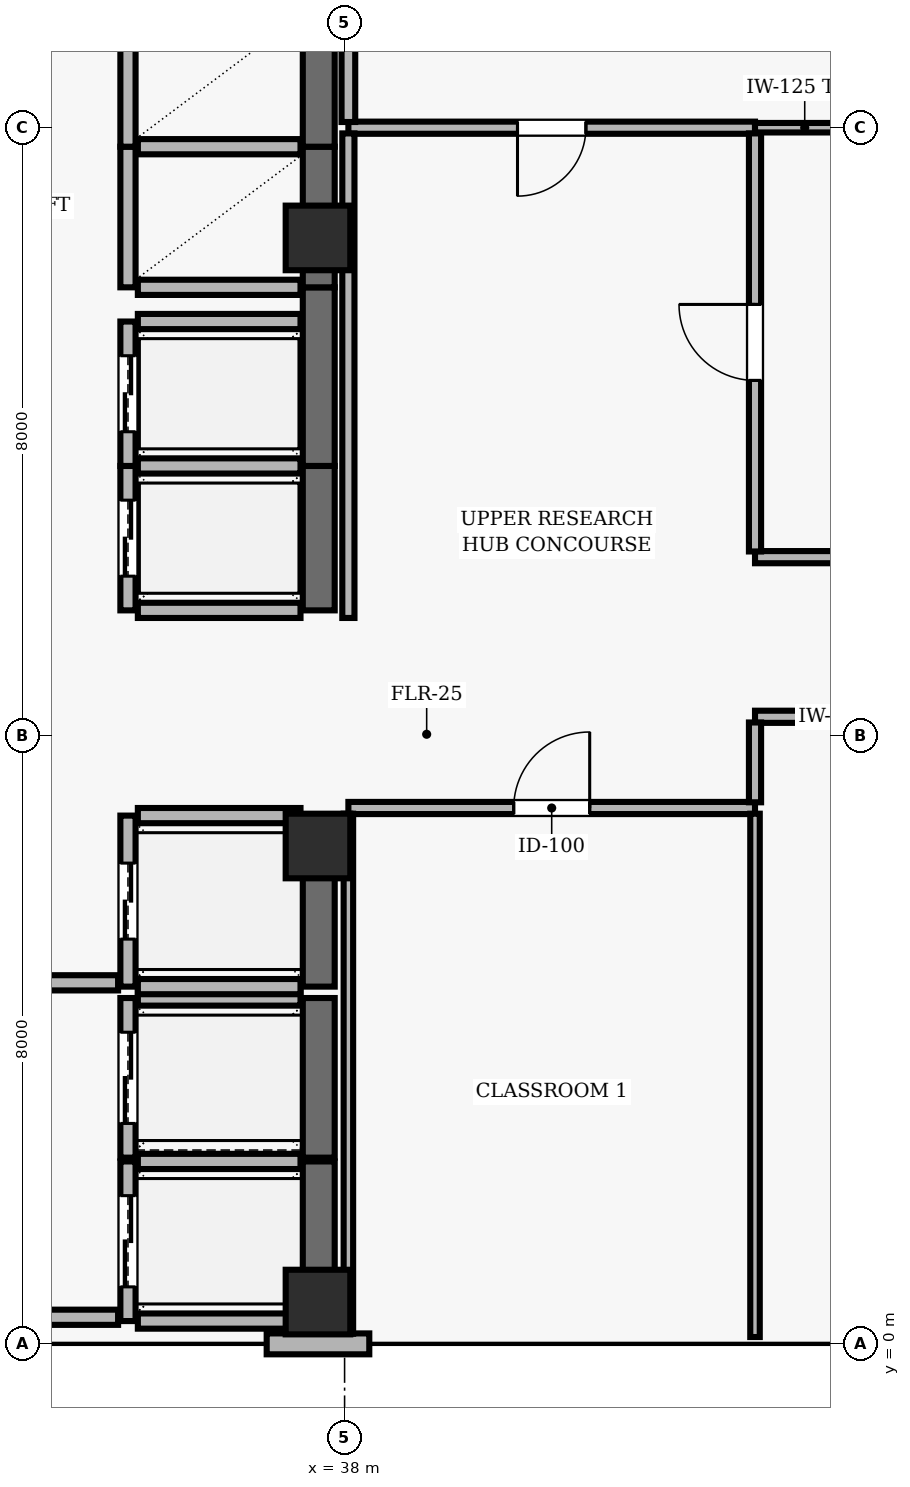
"""IFC4 building model, lengths in metres.
Left out: names, types, materials, properties, quantities, classifications, styles, units other than length and angle.
Written with IfcOpenShell. Run it as: python <this file> out.ifc"""

import sys

from ifc_helpers import new_model, si_unit, direction, frame, frame_2d, origin, origin_2d, place, context, subcontext, project, spatial, rectangle, extrude, element, fill, save


model = new_model("IFC4")
c1 = context("Model", 3, precision=1e-05, world=origin(), true_north=direction((0.0, 1.0)))
c2 = subcontext(c1, "Body", "Model", "MODEL_VIEW")
j1 = project(units=[si_unit("LENGTHUNIT", "METRE"), si_unit("PLANEANGLEUNIT", "RADIAN")], contexts=[c1])
p1 = place(None, origin())
s1 = spatial("IfcSite", under=j1, at=p1, CompositionType="ELEMENT")
p2 = place(p1, origin())
s2 = spatial("IfcBuilding", under=s1, at=p2, CompositionType="ELEMENT")
p3 = place(p2, frame((0.0, 0.0, 256.0)))
s3 = spatial("IfcBuildingStorey", under=s2, at=p3, CompositionType="ELEMENT", Elevation=256.0)
for number, where, z_axis, x_axis in (
    (1, (37.65, 0.55, 0.0), (0.0, 0.0, 1.0), (1.0, 0.0, 0.0)),
    (2, (37.65, 6.55, 0.0), (0.0, 0.0, 1.0), (1.0, 0.0, 0.0)),
    (3, (37.65, 14.55, 0.0), (0.0, 0.0, 1.0), (1.0, 0.0, 0.0)),
):
    element("IfcColumn", number, at=place(p3, frame(where, z_axis=z_axis, x_axis=x_axis)), inside=s3, PredefinedType="COLUMN", context=c2, shape_type="SweptSolid", body=[
        extrude(rectangle(XDim=0.85, YDim=0.85, at=origin_2d()), origin(), (0.0, 0.0, 1.0), 3.9),
    ])
p4 = place(p3, frame((36.975, 0.0, 0.0), z_axis=(0.0, 0.0, 1.0), x_axis=(1.0, 0.0, 0.0)))
e4 = element("IfcWall", 4, at=p4, inside=s3, PredefinedType="SOLIDWALL", context=c2, shape_type="SweptSolid", body=[
    extrude(rectangle(XDim=1.35, YDim=0.275, at=frame_2d((0.675, 0.0))), origin(), (0.0, 0.0, 1.0), 3.69),
])
p5 = place(p3, frame((35.15, 2.4, 0.0), z_axis=(0.0, 0.0, 1.0), x_axis=(0.0, -1.0, 0.0)))
e5 = element("IfcWall", 5, at=p5, inside=s3, PredefinedType="SOLIDWALL", context=c2, shape_type="SweptSolid", body=[
    extrude(rectangle(XDim=2.1, YDim=0.2, at=frame_2d((1.05, 0.0))), origin(), (0.0, 0.0, 1.0), 3.69),
])
p6 = place(p5, frame((0.45, 0.0, 0.0)))
e6 = element("IfcOpeningElement", 6, at=p6, cuts=e5, PredefinedType="OPENING", context=c2, shape_type="SweptSolid", body=[
    extrude(rectangle(XDim=1.2, YDim=2.15, at=frame_2d((0.6, 1.075))), frame((0.0, 0.11, 0.0), z_axis=(0.0, -1.0, 0.0), x_axis=(1.0, 0.0, 0.0)), (0.0, 0.0, 1.0), 0.22),
])
p7 = place(p3, frame((37.66, 0.3, 0.0), z_axis=(0.0, 0.0, 1.0), x_axis=(0.0, 1.0, 0.0)))
e7 = element("IfcWall", 7, at=p7, inside=s3, PredefinedType="SHEAR", context=c2, shape_type="SweptSolid", body=[
    extrude(rectangle(XDim=2.1, YDim=0.42, at=frame_2d((1.05, 0.0))), origin(), (0.0, 0.0, 1.0), 3.69),
])
for number, where, z_axis, x_axis in (
    (8, (35.28, 0.3, 0.0), (0.0, 0.0, 1.0), (1.0, 0.0, 0.0)),
    (9, (37.42, 2.4, 0.0), (0.0, 0.0, 1.0), (-1.0, 0.0, 0.0)),
):
    element("IfcWall", number, at=place(p3, frame(where, z_axis=z_axis, x_axis=x_axis)), inside=s3, PredefinedType="SOLIDWALL", context=c2, shape_type="SweptSolid", body=[
        extrude(rectangle(XDim=2.14, YDim=0.2, at=frame_2d((1.07, 0.0))), origin(), (0.0, 0.0, 1.0), 3.69),
    ])
p8 = place(p3, frame((35.15, 4.55, 0.0), z_axis=(0.0, 0.0, 1.0), x_axis=(0.0, -1.0, 0.0)))
e10 = element("IfcWall", 10, at=p8, inside=s3, PredefinedType="SOLIDWALL", context=c2, shape_type="SweptSolid", body=[
    extrude(rectangle(XDim=2.1, YDim=0.2, at=frame_2d((1.05, 0.0))), origin(), (0.0, 0.0, 1.0), 3.69),
])
p9 = place(p8, frame((0.45, 0.0, 0.0)))
e11 = element("IfcOpeningElement", 11, at=p9, cuts=e10, PredefinedType="OPENING", context=c2, shape_type="SweptSolid", body=[
    extrude(rectangle(XDim=1.2, YDim=2.15, at=frame_2d((0.6, 1.075))), frame((0.0, 0.11, 0.0), z_axis=(0.0, -1.0, 0.0), x_axis=(1.0, 0.0, 0.0)), (0.0, 0.0, 1.0), 0.22),
])
p10 = place(p3, frame((37.66, 2.45, 0.0), z_axis=(0.0, 0.0, 1.0), x_axis=(0.0, 1.0, 0.0)))
e12 = element("IfcWall", 12, at=p10, inside=s3, PredefinedType="SHEAR", context=c2, shape_type="SweptSolid", body=[
    extrude(rectangle(XDim=2.1, YDim=0.42, at=frame_2d((1.05, 0.0))), origin(), (0.0, 0.0, 1.0), 3.69),
])
p11 = place(p3, frame((37.42, 4.55, 0.0), z_axis=(0.0, 0.0, 1.0), x_axis=(-1.0, 0.0, 0.0)))
e13 = element("IfcWall", 13, at=p11, inside=s3, PredefinedType="SOLIDWALL", context=c2, shape_type="SweptSolid", body=[
    extrude(rectangle(XDim=2.14, YDim=0.2, at=frame_2d((1.07, 0.0))), origin(), (0.0, 0.0, 1.0), 3.69),
])
p12 = place(p3, frame((35.15, 6.95, 0.0), z_axis=(0.0, 0.0, 1.0), x_axis=(0.0, -1.0, 0.0)))
e14 = element("IfcWall", 14, at=p12, inside=s3, PredefinedType="SOLIDWALL", context=c2, shape_type="SweptSolid", body=[
    extrude(rectangle(XDim=2.25, YDim=0.2, at=frame_2d((1.125, 0.0))), origin(), (0.0, 0.0, 1.0), 3.69),
])
p13 = place(p12, frame((0.625, 0.0, 0.0)))
e15 = element("IfcOpeningElement", 15, at=p13, cuts=e14, PredefinedType="OPENING", context=c2, shape_type="SweptSolid", body=[
    extrude(rectangle(XDim=1.0, YDim=2.1, at=frame_2d((0.5, 1.05))), frame((0.0, 0.11, 0.0), z_axis=(0.0, -1.0, 0.0), x_axis=(1.0, 0.0, 0.0)), (0.0, 0.0, 1.0), 0.22),
])
p14 = place(p3, frame((37.66, 4.7, 0.0), z_axis=(0.0, 0.0, 1.0), x_axis=(0.0, 1.0, 0.0)))
e16 = element("IfcWall", 16, at=p14, inside=s3, PredefinedType="SHEAR", context=c2, shape_type="SweptSolid", body=[
    extrude(rectangle(XDim=2.25, YDim=0.42, at=frame_2d((1.125, 0.0))), origin(), (0.0, 0.0, 1.0), 3.69),
])
for number, where, z_axis, x_axis in (
    (17, (35.28, 4.7, 0.0), (0.0, 0.0, 1.0), (1.0, 0.0, 0.0)),
    (18, (37.42, 6.95, 0.0), (0.0, 0.0, 1.0), (-1.0, 0.0, 0.0)),
):
    element("IfcWall", number, at=place(p3, frame(where, z_axis=z_axis, x_axis=x_axis)), inside=s3, PredefinedType="SOLIDWALL", context=c2, shape_type="SweptSolid", body=[
        extrude(rectangle(XDim=2.14, YDim=0.2, at=frame_2d((1.07, 0.0))), origin(), (0.0, 0.0, 1.0), 3.69),
    ])
p15 = place(p3, frame((35.15, 11.55, 0.0), z_axis=(0.0, 0.0, 1.0), x_axis=(0.0, -1.0, 0.0)))
e19 = element("IfcWall", 19, at=p15, inside=s3, PredefinedType="SOLIDWALL", context=c2, shape_type="SweptSolid", body=[
    extrude(rectangle(XDim=1.9, YDim=0.2, at=frame_2d((0.95, 0.0))), origin(), (0.0, 0.0, 1.0), 3.69),
])
p16 = place(p15, frame((0.45, 0.0, 0.0)))
e20 = element("IfcOpeningElement", 20, at=p16, cuts=e19, PredefinedType="OPENING", context=c2, shape_type="SweptSolid", body=[
    extrude(rectangle(XDim=1.0, YDim=2.1, at=frame_2d((0.5, 1.05))), frame((0.0, 0.11, 0.0), z_axis=(0.0, -1.0, 0.0), x_axis=(1.0, 0.0, 0.0)), (0.0, 0.0, 1.0), 0.22),
])
p17 = place(p3, frame((37.66, 9.65, 0.0), z_axis=(0.0, 0.0, 1.0), x_axis=(0.0, 1.0, 0.0)))
e21 = element("IfcWall", 21, at=p17, inside=s3, PredefinedType="SHEAR", context=c2, shape_type="SweptSolid", body=[
    extrude(rectangle(XDim=1.9, YDim=0.42, at=frame_2d((0.95, 0.0))), origin(), (0.0, 0.0, 1.0), 3.69),
])
for number, where, z_axis, x_axis in (
    (22, (35.28, 9.65, 0.0), (0.0, 0.0, 1.0), (1.0, 0.0, 0.0)),
    (23, (37.42, 11.55, 0.0), (0.0, 0.0, 1.0), (-1.0, 0.0, 0.0)),
):
    element("IfcWall", number, at=place(p3, frame(where, z_axis=z_axis, x_axis=x_axis)), inside=s3, PredefinedType="SOLIDWALL", context=c2, shape_type="SweptSolid", body=[
        extrude(rectangle(XDim=2.14, YDim=0.2, at=frame_2d((1.07, 0.0))), origin(), (0.0, 0.0, 1.0), 3.69),
    ])
p18 = place(p3, frame((35.15, 13.45, 0.0), z_axis=(0.0, 0.0, 1.0), x_axis=(0.0, -1.0, 0.0)))
e24 = element("IfcWall", 24, at=p18, inside=s3, PredefinedType="SOLIDWALL", context=c2, shape_type="SweptSolid", body=[
    extrude(rectangle(XDim=1.9, YDim=0.2, at=frame_2d((0.95, 0.0))), origin(), (0.0, 0.0, 1.0), 3.69),
])
p19 = place(p18, frame((0.45, 0.0, 0.0)))
e25 = element("IfcOpeningElement", 25, at=p19, cuts=e24, PredefinedType="OPENING", context=c2, shape_type="SweptSolid", body=[
    extrude(rectangle(XDim=1.0, YDim=2.1, at=frame_2d((0.5, 1.05))), frame((0.0, 0.11, 0.0), z_axis=(0.0, -1.0, 0.0), x_axis=(1.0, 0.0, 0.0)), (0.0, 0.0, 1.0), 0.22),
])
p20 = place(p3, frame((37.66, 11.55, 0.0), z_axis=(0.0, 0.0, 1.0), x_axis=(0.0, 1.0, 0.0)))
e26 = element("IfcWall", 26, at=p20, inside=s3, PredefinedType="SHEAR", context=c2, shape_type="SweptSolid", body=[
    extrude(rectangle(XDim=2.35, YDim=0.42, at=frame_2d((1.175, 0.0))), origin(), (0.0, 0.0, 1.0), 3.69),
])
p21 = place(p3, frame((37.42, 13.45, 0.0), z_axis=(0.0, 0.0, 1.0), x_axis=(-1.0, 0.0, 0.0)))
e27 = element("IfcWall", 27, at=p21, inside=s3, PredefinedType="SOLIDWALL", context=c2, shape_type="SweptSolid", body=[
    extrude(rectangle(XDim=2.14, YDim=0.2, at=frame_2d((1.07, 0.0))), origin(), (0.0, 0.0, 1.0), 3.69),
])
p22 = place(p3, frame((35.15, 15.75, 0.0), z_axis=(0.0, 0.0, 1.0), x_axis=(0.0, -1.0, 0.0)))
e28 = element("IfcWall", 28, at=p22, inside=s3, PredefinedType="SOLIDWALL", context=c2, shape_type="SweptSolid", body=[
    extrude(rectangle(XDim=1.85, YDim=0.2, at=frame_2d((0.925, 0.0))), origin(), (0.0, 0.0, 1.0), 3.69),
])
p23 = place(p3, frame((37.66, 13.9, 0.0), z_axis=(0.0, 0.0, 1.0), x_axis=(0.0, 1.0, 0.0)))
e29 = element("IfcWall", 29, at=p23, inside=s3, PredefinedType="SHEAR", context=c2, shape_type="SweptSolid", body=[
    extrude(rectangle(XDim=1.85, YDim=0.42, at=frame_2d((0.925, 0.0))), origin(), (0.0, 0.0, 1.0), 3.69),
])
for number, where, z_axis, x_axis in (
    (30, (35.28, 13.9, 0.0), (0.0, 0.0, 1.0), (1.0, 0.0, 0.0)),
    (31, (37.42, 15.75, 0.0), (0.0, 0.0, 1.0), (-1.0, 0.0, 0.0)),
):
    element("IfcWall", number, at=place(p3, frame(where, z_axis=z_axis, x_axis=x_axis)), inside=s3, PredefinedType="SOLIDWALL", context=c2, shape_type="SweptSolid", body=[
        extrude(rectangle(XDim=2.14, YDim=0.2, at=frame_2d((1.07, 0.0))), origin(), (0.0, 0.0, 1.0), 3.69),
    ])
p24 = place(p3, frame((35.15, 17.6, 0.0), z_axis=(0.0, 0.0, 1.0), x_axis=(0.0, -1.0, 0.0)))
e32 = element("IfcWall", 32, at=p24, inside=s3, PredefinedType="SOLIDWALL", context=c2, shape_type="SweptSolid", body=[
    extrude(rectangle(XDim=1.85, YDim=0.2, at=frame_2d((0.925, 0.0))), origin(), (0.0, 0.0, 1.0), 3.69),
])
p25 = place(p3, frame((37.66, 15.75, 0.0), z_axis=(0.0, 0.0, 1.0), x_axis=(0.0, 1.0, 0.0)))
e33 = element("IfcWall", 33, at=p25, inside=s3, PredefinedType="SHEAR", context=c2, shape_type="SweptSolid", body=[
    extrude(rectangle(XDim=1.85, YDim=0.42, at=frame_2d((0.925, 0.0))), origin(), (0.0, 0.0, 1.0), 3.69),
])
p26 = place(p3, frame((31.65, 0.35, 0.0), z_axis=(0.0, 0.0, 1.0), x_axis=(1.0, 0.0, 0.0)))
e34 = element("IfcWall", 34, at=p26, inside=s3, PredefinedType="SOLIDWALL", context=c2, shape_type="SweptSolid", body=[
    extrude(rectangle(XDim=3.37, YDim=0.2, at=frame_2d((1.685, 0.0))), origin(), (0.0, 0.0, 1.0), 3.69),
])
p27 = place(p3, frame((35.02, 4.75, 0.0), z_axis=(0.0, 0.0, 1.0), x_axis=(-1.0, 0.0, 0.0)))
e35 = element("IfcWall", 35, at=p27, inside=s3, PredefinedType="SOLIDWALL", context=c2, shape_type="SweptSolid", body=[
    extrude(rectangle(XDim=3.11, YDim=0.2, at=frame_2d((1.555, 0.0))), origin(), (0.0, 0.0, 1.0), 3.69),
])
p28 = place(p27, frame((1.03, 0.0, 0.0)))
e36 = element("IfcOpeningElement", 36, at=p28, cuts=e35, PredefinedType="OPENING", context=c2, shape_type="SweptSolid", body=[
    extrude(rectangle(XDim=1.05, YDim=2.15, at=frame_2d((0.525, 1.075))), frame((0.0, 0.11, 0.0), z_axis=(0.0, -1.0, 0.0), x_axis=(1.0, 0.0, 0.0)), (0.0, 0.0, 1.0), 0.22),
])
p29 = place(p3, frame((38.05, 7.05, 0.0), z_axis=(0.0, 0.0, 1.0), x_axis=(1.0, 0.0, 0.0)))
e37 = element("IfcWall", 37, at=p29, inside=s3, PredefinedType="PARTITIONING", context=c2, shape_type="SweptSolid", body=[
    extrude(rectangle(XDim=5.35, YDim=0.16, at=frame_2d((2.675, 0.0))), origin(), (0.0, 0.0, 1.0), 3.69),
])
p30 = place(p29, frame((2.175, 0.0, 0.0)))
e38 = element("IfcOpeningElement", 38, at=p30, cuts=e37, PredefinedType="OPENING", context=c2, shape_type="SweptSolid", body=[
    extrude(rectangle(XDim=1.0, YDim=2.1, at=frame_2d((0.5, 1.05))), frame((0.0, 0.09, 0.0), z_axis=(0.0, -1.0, 0.0), x_axis=(1.0, 0.0, 0.0)), (0.0, 0.0, 1.0), 0.18),
])
p31 = place(p3, frame((43.4, 8.25, 0.0), z_axis=(0.0, 0.0, 1.0), x_axis=(1.0, 0.0, 0.0)))
e39 = element("IfcWall", 39, at=p31, inside=s3, PredefinedType="PARTITIONING", context=c2, shape_type="SweptSolid", body=[
    extrude(rectangle(XDim=5.41, YDim=0.16, at=frame_2d((2.705, 0.0))), origin(), (0.0, 0.0, 1.0), 3.221),
])
p32 = place(p31, frame((3.655, 0.0, 0.0)))
e40 = element("IfcOpeningElement", 40, at=p32, cuts=e39, PredefinedType="OPENING", context=c2, shape_type="SweptSolid", body=[
    extrude(rectangle(XDim=0.9, YDim=2.1, at=frame_2d((0.45, 1.05))), frame((0.0, 0.09, 0.0), z_axis=(0.0, -1.0, 0.0), x_axis=(1.0, 0.0, 0.0)), (0.0, 0.0, 1.0), 0.18),
])
p33 = place(p3, frame((43.4, 16.0, 0.0), z_axis=(0.0, 0.0, 1.0), x_axis=(-1.0, 0.0, 0.0)))
e41 = element("IfcWall", 41, at=p33, inside=s3, PredefinedType="PARTITIONING", context=c2, shape_type="SweptSolid", body=[
    extrude(rectangle(XDim=5.35, YDim=0.16, at=frame_2d((2.675, 0.0))), origin(), (0.0, 0.0, 1.0), 3.39),
])
p34 = place(p33, frame((2.225, 0.0, 0.0)))
e42 = element("IfcOpeningElement", 42, at=p34, cuts=e41, PredefinedType="OPENING", context=c2, shape_type="SweptSolid", body=[
    extrude(rectangle(XDim=0.9, YDim=2.1, at=frame_2d((0.45, 1.05))), frame((0.0, 0.09, 0.0), z_axis=(0.0, -1.0, 0.0), x_axis=(1.0, 0.0, 0.0)), (0.0, 0.0, 1.0), 0.18),
])
p35 = place(p3, frame((43.4, 16.0, 0.0), z_axis=(0.0, 0.0, 1.0), x_axis=(1.0, 0.0, 0.0)))
e43 = element("IfcWall", 43, at=p35, inside=s3, PredefinedType="PARTITIONING", context=c2, shape_type="SweptSolid", body=[
    extrude(rectangle(XDim=1.308, YDim=0.125, at=frame_2d((0.654, 0.0))), origin(), (0.0, 0.0, 1.0), 3.39),
])
p36 = place(p3, frame((48.81, 10.35, 0.0), z_axis=(0.0, 0.0, 1.0), x_axis=(-1.0, 0.0, 0.0)))
e44 = element("IfcWall", 44, at=p36, inside=s3, PredefinedType="PARTITIONING", context=c2, shape_type="SweptSolid", body=[
    extrude(rectangle(XDim=5.41, YDim=0.16, at=frame_2d((2.705, 0.0))), origin(), (0.0, 0.0, 1.0), 3.372),
])
p37 = place(p3, frame((38.05, 6.975, 0.0), z_axis=(0.0, 0.0, 1.0), x_axis=(0.0, -1.0, 0.0)))
e45 = element("IfcWall", 45, at=p37, inside=s3, PredefinedType="PARTITIONING", context=c2, shape_type="SweptSolid", body=[
    extrude(rectangle(XDim=6.842, YDim=0.125, at=frame_2d((3.421, 0.0))), origin(), (0.0, 0.0, 1.0), 3.221),
])
p38 = place(p3, frame((38.05, 15.925, 0.0), z_axis=(0.0, 0.0, 1.0), x_axis=(0.0, -1.0, 0.0)))
e46 = element("IfcWall", 46, at=p38, inside=s3, PredefinedType="PARTITIONING", context=c2, shape_type="SweptSolid", body=[
    extrude(rectangle(XDim=6.375, YDim=0.16, at=frame_2d((3.188, 0.0))), origin(), (0.0, 0.0, 1.0), 3.221),
])
p39 = place(p3, frame((38.05, 23.85, 0.0), z_axis=(0.0, 0.0, 1.0), x_axis=(0.0, -1.0, 0.0)))
e47 = element("IfcWall", 47, at=p39, inside=s3, PredefinedType="PARTITIONING", context=c2, shape_type="SweptSolid", body=[
    extrude(rectangle(XDim=7.775, YDim=0.18, at=frame_2d((3.888, 0.0))), origin(), (0.0, 0.0, 1.0), 3.221),
])
p40 = place(p3, frame((43.4, 0.09, 0.0), z_axis=(0.0, 0.0, 1.0), x_axis=(0.0, 1.0, 0.0)))
e48 = element("IfcWall", 48, at=p40, inside=s3, PredefinedType="PARTITIONING", context=c2, shape_type="SweptSolid", body=[
    extrude(rectangle(XDim=6.885, YDim=0.125, at=frame_2d((3.442, 0.0))), origin(), (0.0, 0.0, 1.0), 3.69),
])
p41 = place(p3, frame((43.4, 7.125, 0.0), z_axis=(0.0, 0.0, 1.0), x_axis=(0.0, 1.0, 0.0)))
e49 = element("IfcWall", 49, at=p41, inside=s3, PredefinedType="PARTITIONING", context=c2, shape_type="SweptSolid", body=[
    extrude(rectangle(XDim=1.05, YDim=0.16, at=frame_2d((0.525, 0.0))), origin(), (0.0, 0.0, 1.0), 3.69),
])
p42 = place(p3, frame((43.4, 10.425, 0.0), z_axis=(0.0, 0.0, 1.0), x_axis=(0.0, 1.0, 0.0)))
e50 = element("IfcWall", 50, at=p42, inside=s3, PredefinedType="PARTITIONING", context=c2, shape_type="SweptSolid", body=[
    extrude(rectangle(XDim=5.5, YDim=0.16, at=frame_2d((2.75, 0.0))), origin(), (0.0, 0.0, 1.0), 3.69),
])
p43 = place(p42, frame((2.25, 0.0, 0.0)))
e51 = element("IfcOpeningElement", 51, at=p43, cuts=e50, PredefinedType="OPENING", context=c2, shape_type="SweptSolid", body=[
    extrude(rectangle(XDim=1.0, YDim=2.1, at=frame_2d((0.5, 1.05))), frame((0.0, 0.09, 0.0), z_axis=(0.0, -1.0, 0.0), x_axis=(1.0, 0.0, 0.0)), (0.0, 0.0, 1.0), 0.18),
])
p44 = place(p6, origin())
e52 = element("IfcDoor", 52, at=p44, inside=s3, OperationType="DOUBLE_DOOR_SLIDING", PredefinedType="DOOR", context=c2, shape_type="SweptSolid", body=[
    extrude(rectangle(XDim=1.2, YDim=2.15, at=frame_2d((0.6, 1.075))), frame((0.0, 0.025, 0.0), z_axis=(0.0, -1.0, 0.0), x_axis=(1.0, 0.0, 0.0)), (0.0, 0.0, 1.0), 0.05),
])
fill(e6, e52)
p45 = place(p9, origin())
e53 = element("IfcDoor", 53, at=p45, inside=s3, OperationType="DOUBLE_DOOR_SLIDING", PredefinedType="DOOR", context=c2, shape_type="SweptSolid", body=[
    extrude(rectangle(XDim=1.2, YDim=2.15, at=frame_2d((0.6, 1.075))), frame((0.0, 0.025, 0.0), z_axis=(0.0, -1.0, 0.0), x_axis=(1.0, 0.0, 0.0)), (0.0, 0.0, 1.0), 0.05),
])
fill(e11, e53)
p46 = place(p13, origin())
e54 = element("IfcDoor", 54, at=p46, inside=s3, OperationType="DOUBLE_DOOR_SLIDING", PredefinedType="DOOR", context=c2, shape_type="SweptSolid", body=[
    extrude(rectangle(XDim=1.0, YDim=2.1, at=frame_2d((0.5, 1.05))), frame((0.0, 0.025, 0.0), z_axis=(0.0, -1.0, 0.0), x_axis=(1.0, 0.0, 0.0)), (0.0, 0.0, 1.0), 0.05),
])
fill(e15, e54)
p47 = place(p16, origin())
e55 = element("IfcDoor", 55, at=p47, inside=s3, OperationType="DOUBLE_DOOR_SLIDING", PredefinedType="DOOR", context=c2, shape_type="SweptSolid", body=[
    extrude(rectangle(XDim=1.0, YDim=2.1, at=frame_2d((0.5, 1.05))), frame((0.0, 0.025, 0.0), z_axis=(0.0, -1.0, 0.0), x_axis=(1.0, 0.0, 0.0)), (0.0, 0.0, 1.0), 0.05),
])
fill(e20, e55)
p48 = place(p19, origin())
e56 = element("IfcDoor", 56, at=p48, inside=s3, OperationType="DOUBLE_DOOR_SLIDING", PredefinedType="DOOR", context=c2, shape_type="SweptSolid", body=[
    extrude(rectangle(XDim=1.0, YDim=2.1, at=frame_2d((0.5, 1.05))), frame((0.0, 0.025, 0.0), z_axis=(0.0, -1.0, 0.0), x_axis=(1.0, 0.0, 0.0)), (0.0, 0.0, 1.0), 0.05),
])
fill(e25, e56)
p49 = place(p30, origin())
e57 = element("IfcDoor", 57, at=p49, inside=s3, OperationType="SINGLE_SWING_RIGHT", PredefinedType="DOOR", context=c2, shape_type="SweptSolid", body=[
    extrude(rectangle(XDim=1.0, YDim=2.1, at=frame_2d((0.5, 1.05))), frame((0.0, 0.025, 0.0), z_axis=(0.0, -1.0, 0.0), x_axis=(1.0, 0.0, 0.0)), (0.0, 0.0, 1.0), 0.05),
])
fill(e38, e57)
p50 = place(p43, origin())
e58 = element("IfcDoor", 58, at=p50, inside=s3, OperationType="SINGLE_SWING_RIGHT", PredefinedType="DOOR", context=c2, shape_type="SweptSolid", body=[
    extrude(rectangle(XDim=1.0, YDim=2.1, at=frame_2d((0.5, 1.05))), frame((0.0, 0.025, 0.0), z_axis=(0.0, -1.0, 0.0), x_axis=(1.0, 0.0, 0.0)), (0.0, 0.0, 1.0), 0.05),
])
fill(e51, e58)
p51 = place(p34, origin())
e59 = element("IfcDoor", 59, at=p51, inside=s3, OperationType="SINGLE_SWING_RIGHT", PredefinedType="DOOR", context=c2, shape_type="SweptSolid", body=[
    extrude(rectangle(XDim=0.9, YDim=2.1, at=frame_2d((0.45, 1.05))), frame((0.0, 0.025, 0.0), z_axis=(0.0, -1.0, 0.0), x_axis=(1.0, 0.0, 0.0)), (0.0, 0.0, 1.0), 0.05),
])
fill(e42, e59)
save(model, sys.argv[1])
